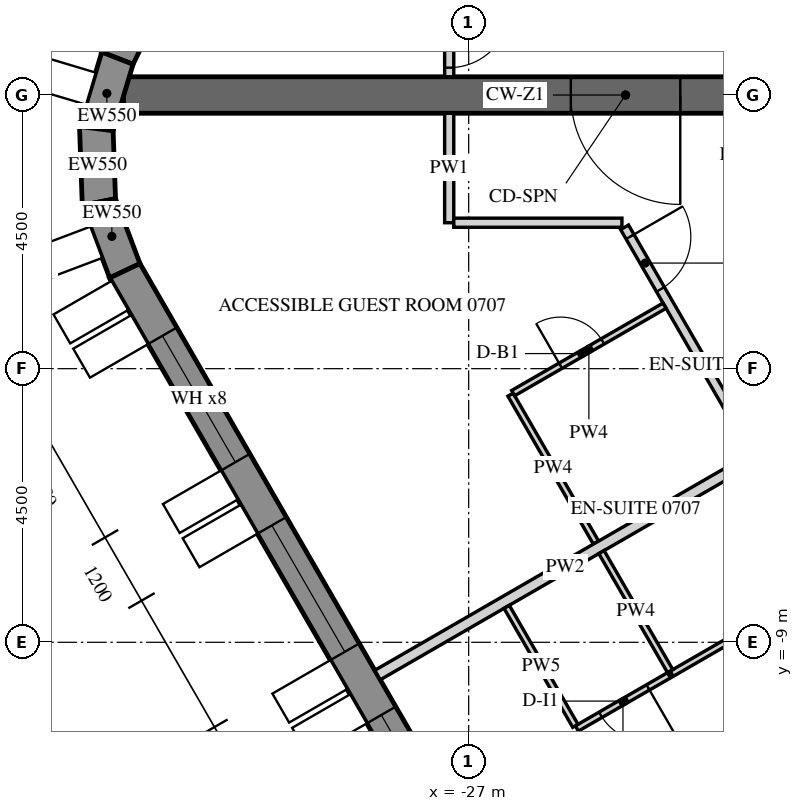
"""IFC4 building model, lengths in metres.
Left out: names, types, materials, properties, quantities, classifications, styles, units other than length and angle.
Written with IfcOpenShell. Run it as: python <this file> out.ifc"""

import sys

from ifc_helpers import new_model, si_unit, direction, frame, frame_2d, origin, place, context, subcontext, project, spatial, polyline, rectangle, outline, extrude, element, fill, save


model = new_model("IFC4")
c1 = context("Model", 3, precision=1e-05, world=origin(), true_north=direction((0.0, 1.0)))
c2 = subcontext(c1, "Body", "Model", "MODEL_VIEW")
j1 = project(units=[si_unit("LENGTHUNIT", "METRE"), si_unit("PLANEANGLEUNIT", "RADIAN")], contexts=[c1])
p1 = place(None, origin())
s1 = spatial("IfcSite", under=j1, at=p1, CompositionType="ELEMENT")
p2 = place(p1, origin())
s2 = spatial("IfcBuilding", under=s1, at=p2, CompositionType="ELEMENT")
p3 = place(p2, frame((0.0, 0.0, 99.9)))
s3 = spatial("IfcBuildingStorey", under=s2, at=p3, CompositionType="ELEMENT", Elevation=99.9)
p4 = place(p3, frame((-19.595, 27.633, -0.15), z_axis=(0.0, 0.0, 1.0), x_axis=(-0.438368285794, -0.898795441694, 0.0)))
e1 = element("IfcWall", 1, at=p4, inside=s3, PredefinedType="SOLIDWALL", context=c2, shape_type="SweptSolid", body=[
    extrude(outline(polyline([(-0.026, -0.275), (30.093, -0.275), (30.048, 0.275), (0.026, 0.275), (-0.026, -0.275)])), origin(), (0.0, 0.0, 1.0), 3.9),
])
p5 = place(p4, frame((1.236, 0.0, 1.05)))
e2 = element("IfcOpeningElement", 2, at=p5, cuts=e1, PredefinedType="OPENING", context=c2, shape_type="SweptSolid", body=[
    extrude(rectangle(XDim=2.4, YDim=2.4, at=frame_2d((1.2, 1.2))), frame((0.0, 0.285, 0.0), z_axis=(0.0, -1.0, 0.0), x_axis=(1.0, 0.0, 0.0)), (0.0, 0.0, 1.0), 0.57),
])
p6 = place(p4, frame((4.835, 0.0, 1.05)))
e3 = element("IfcOpeningElement", 3, at=p6, cuts=e1, PredefinedType="OPENING", context=c2, shape_type="SweptSolid", body=[
    extrude(rectangle(XDim=2.4, YDim=2.4, at=frame_2d((1.2, 1.2))), frame((0.0, 0.285, 0.0), z_axis=(0.0, -1.0, 0.0), x_axis=(1.0, 0.0, 0.0)), (0.0, 0.0, 1.0), 0.57),
])
p7 = place(p4, frame((8.436, 0.0, 1.05)))
e4 = element("IfcOpeningElement", 4, at=p7, cuts=e1, PredefinedType="OPENING", context=c2, shape_type="SweptSolid", body=[
    extrude(rectangle(XDim=2.4, YDim=2.4, at=frame_2d((1.2, 1.2))), frame((0.0, 0.285, 0.0), z_axis=(0.0, -1.0, 0.0), x_axis=(1.0, 0.0, 0.0)), (0.0, 0.0, 1.0), 0.57),
])
p8 = place(p4, frame((12.035, 0.0, 1.05)))
e5 = element("IfcOpeningElement", 5, at=p8, cuts=e1, PredefinedType="OPENING", context=c2, shape_type="SweptSolid", body=[
    extrude(rectangle(XDim=2.4, YDim=2.4, at=frame_2d((1.2, 1.2))), frame((0.0, 0.285, 0.0), z_axis=(0.0, -1.0, 0.0), x_axis=(1.0, 0.0, 0.0)), (0.0, 0.0, 1.0), 0.57),
])
p9 = place(p4, frame((15.635, 0.0, 1.05)))
e6 = element("IfcOpeningElement", 6, at=p9, cuts=e1, PredefinedType="OPENING", context=c2, shape_type="SweptSolid", body=[
    extrude(rectangle(XDim=2.4, YDim=2.4, at=frame_2d((1.2, 1.2))), frame((0.0, 0.285, 0.0), z_axis=(0.0, -1.0, 0.0), x_axis=(1.0, 0.0, 0.0)), (0.0, 0.0, 1.0), 0.57),
])
p10 = place(p4, frame((19.236, 0.0, 1.05)))
e7 = element("IfcOpeningElement", 7, at=p10, cuts=e1, PredefinedType="OPENING", context=c2, shape_type="SweptSolid", body=[
    extrude(rectangle(XDim=2.4, YDim=2.4, at=frame_2d((1.2, 1.2))), frame((0.0, 0.285, 0.0), z_axis=(0.0, -1.0, 0.0), x_axis=(1.0, 0.0, 0.0)), (0.0, 0.0, 1.0), 0.57),
])
p11 = place(p4, frame((22.835, 0.0, 1.05)))
e8 = element("IfcOpeningElement", 8, at=p11, cuts=e1, PredefinedType="OPENING", context=c2, shape_type="SweptSolid", body=[
    extrude(rectangle(XDim=2.4, YDim=2.4, at=frame_2d((1.2, 1.2))), frame((0.0, 0.285, 0.0), z_axis=(0.0, -1.0, 0.0), x_axis=(1.0, 0.0, 0.0)), (0.0, 0.0, 1.0), 0.57),
])
p12 = place(p4, frame((26.436, 0.0, 1.05)))
e9 = element("IfcOpeningElement", 9, at=p12, cuts=e1, PredefinedType="OPENING", context=c2, shape_type="SweptSolid", body=[
    extrude(rectangle(XDim=2.4, YDim=2.4, at=frame_2d((1.2, 1.2))), frame((0.0, 0.285, 0.0), z_axis=(0.0, -1.0, 0.0), x_axis=(1.0, 0.0, 0.0)), (0.0, 0.0, 1.0), 0.57),
])
p13 = place(p3, frame((-32.777, 0.605, -0.15), z_axis=(0.0, 0.0, 1.0), x_axis=(-0.286921497463, -0.957954098219, 0.0)))
e10 = element("IfcWall", 10, at=p13, inside=s3, PredefinedType="SOLIDWALL", context=c2, shape_type="SweptSolid", body=[
    extrude(outline(polyline([(-0.022, -0.275), (1.253, -0.275), (1.163, 0.275), (0.022, 0.275), (-0.022, -0.275)])), origin(), (0.0, 0.0, 1.0), 3.9),
])
p14 = place(p3, frame((-33.124, -0.552, -0.15), z_axis=(0.0, 0.0, 1.0), x_axis=(0.03495638276, -0.999388838893, 0.0)))
e11 = element("IfcWall", 11, at=p14, inside=s3, PredefinedType="SOLIDWALL", context=c2, shape_type="SweptSolid", body=[
    extrude(outline(polyline([(-0.045, -0.275), (1.253, -0.275), (1.163, 0.275), (0.045, 0.275), (-0.045, -0.275)])), origin(), (0.0, 0.0, 1.0), 3.9),
])
p15 = place(p3, frame((-33.081, -1.76, -0.15), z_axis=(0.0, 0.0, 1.0), x_axis=(0.353027214741, -0.935613053378, 0.0)))
e12 = element("IfcWall", 12, at=p15, inside=s3, PredefinedType="SOLIDWALL", context=c2, shape_type="SweptSolid", body=[
    extrude(outline(polyline([(-0.045, -0.275), (1.231, -0.275), (1.186, 0.275), (0.045, 0.275), (-0.045, -0.275)])), origin(), (0.0, 0.0, 1.0), 3.9),
])
p16 = place(p3, frame((-32.655, -2.89, -0.15), z_axis=(0.0, 0.0, 1.0), x_axis=(0.499997711317, -0.866026725152, 0.0)))
e13 = element("IfcWall", 13, at=p16, inside=s3, PredefinedType="SOLIDWALL", context=c2, shape_type="SweptSolid", body=[
    extrude(outline(polyline([(-0.022, -0.275), (30.097, -0.275), (30.045, 0.275), (0.022, 0.275), (-0.022, -0.275)])), origin(), (0.0, 0.0, 1.0), 3.9),
])
p17 = place(p16, frame((1.236, 0.0, 1.05)))
e14 = element("IfcOpeningElement", 14, at=p17, cuts=e13, PredefinedType="OPENING", context=c2, shape_type="SweptSolid", body=[
    extrude(rectangle(XDim=2.4, YDim=2.4, at=frame_2d((1.2, 1.2))), frame((0.0, 0.285, 0.0), z_axis=(0.0, -1.0, 0.0), x_axis=(1.0, 0.0, 0.0)), (0.0, 0.0, 1.0), 0.57),
])
p18 = place(p16, frame((4.835, 0.0, 1.05)))
e15 = element("IfcOpeningElement", 15, at=p18, cuts=e13, PredefinedType="OPENING", context=c2, shape_type="SweptSolid", body=[
    extrude(rectangle(XDim=2.4, YDim=2.4, at=frame_2d((1.2, 1.2))), frame((0.0, 0.285, 0.0), z_axis=(0.0, -1.0, 0.0), x_axis=(1.0, 0.0, 0.0)), (0.0, 0.0, 1.0), 0.57),
])
p19 = place(p16, frame((8.436, 0.0, 1.05)))
e16 = element("IfcOpeningElement", 16, at=p19, cuts=e13, PredefinedType="OPENING", context=c2, shape_type="SweptSolid", body=[
    extrude(rectangle(XDim=2.4, YDim=2.4, at=frame_2d((1.2, 1.2))), frame((0.0, 0.285, 0.0), z_axis=(0.0, -1.0, 0.0), x_axis=(1.0, 0.0, 0.0)), (0.0, 0.0, 1.0), 0.57),
])
p20 = place(p16, frame((12.035, 0.0, 1.05)))
e17 = element("IfcOpeningElement", 17, at=p20, cuts=e13, PredefinedType="OPENING", context=c2, shape_type="SweptSolid", body=[
    extrude(rectangle(XDim=2.4, YDim=2.4, at=frame_2d((1.2, 1.2))), frame((0.0, 0.285, 0.0), z_axis=(0.0, -1.0, 0.0), x_axis=(1.0, 0.0, 0.0)), (0.0, 0.0, 1.0), 0.57),
])
p21 = place(p16, frame((15.635, 0.0, 1.05)))
e18 = element("IfcOpeningElement", 18, at=p21, cuts=e13, PredefinedType="OPENING", context=c2, shape_type="SweptSolid", body=[
    extrude(rectangle(XDim=2.4, YDim=2.4, at=frame_2d((1.2, 1.2))), frame((0.0, 0.285, 0.0), z_axis=(0.0, -1.0, 0.0), x_axis=(1.0, 0.0, 0.0)), (0.0, 0.0, 1.0), 0.57),
])
p22 = place(p16, frame((19.236, 0.0, 1.05)))
e19 = element("IfcOpeningElement", 19, at=p22, cuts=e13, PredefinedType="OPENING", context=c2, shape_type="SweptSolid", body=[
    extrude(rectangle(XDim=2.4, YDim=2.4, at=frame_2d((1.2, 1.2))), frame((0.0, 0.285, 0.0), z_axis=(0.0, -1.0, 0.0), x_axis=(1.0, 0.0, 0.0)), (0.0, 0.0, 1.0), 0.57),
])
p23 = place(p16, frame((22.835, 0.0, 1.05)))
e20 = element("IfcOpeningElement", 20, at=p23, cuts=e13, PredefinedType="OPENING", context=c2, shape_type="SweptSolid", body=[
    extrude(rectangle(XDim=2.4, YDim=2.4, at=frame_2d((1.2, 1.2))), frame((0.0, 0.285, 0.0), z_axis=(0.0, -1.0, 0.0), x_axis=(1.0, 0.0, 0.0)), (0.0, 0.0, 1.0), 0.57),
])
p24 = place(p16, frame((26.436, 0.0, 1.05)))
e21 = element("IfcOpeningElement", 21, at=p24, cuts=e13, PredefinedType="OPENING", context=c2, shape_type="SweptSolid", body=[
    extrude(rectangle(XDim=2.4, YDim=2.4, at=frame_2d((1.2, 1.2))), frame((0.0, 0.285, 0.0), z_axis=(0.0, -1.0, 0.0), x_axis=(1.0, 0.0, 0.0)), (0.0, 0.0, 1.0), 0.57),
])
p25 = place(p3, frame((-16.166, 0.0, -0.15), z_axis=(0.0, 0.0, 1.0), x_axis=(-1.0, 0.0, 0.0)))
e22 = element("IfcWall", 22, at=p25, inside=s3, PredefinedType="SHEAR", context=c2, shape_type="SweptSolid", body=[
    extrude(rectangle(XDim=16.509, YDim=0.6, at=frame_2d((8.254, 0.0))), origin(), (0.0, 0.0, 1.0), 3.9),
])
p26 = place(p25, frame((7.354, 0.0, 0.15)))
e23 = element("IfcOpeningElement", 23, at=p26, cuts=e22, PredefinedType="OPENING", context=c2, shape_type="SweptSolid", body=[
    extrude(rectangle(XDim=1.8, YDim=2.4, at=frame_2d((0.9, 1.2))), frame((0.0, 0.31, 0.0), z_axis=(0.0, -1.0, 0.0), x_axis=(1.0, 0.0, 0.0)), (0.0, 0.0, 1.0), 0.62),
])
p27 = place(p3, frame((-27.32, 2.025, 0.0), z_axis=(0.0, 0.0, 1.0), x_axis=(0.0, -1.0, 0.0)))
e24 = element("IfcWall", 24, at=p27, inside=s3, PredefinedType="PARTITIONING", context=c2, shape_type="SweptSolid", body=[
    extrude(rectangle(XDim=1.725, YDim=0.15, at=frame_2d((0.862, 0.0))), origin(), (0.0, 0.0, 1.0), 2.988),
])
p28 = place(p27, frame((0.575, 0.0, 0.0)))
e25 = element("IfcOpeningElement", 25, at=p28, cuts=e24, PredefinedType="OPENING", context=c2, shape_type="SweptSolid", body=[
    extrude(rectangle(XDim=1.0, YDim=2.1, at=frame_2d((0.5, 1.05))), frame((0.0, 0.085, 0.0), z_axis=(0.0, -1.0, 0.0), x_axis=(1.0, 0.0, 0.0)), (0.0, 0.0, 1.0), 0.17),
])
p29 = place(p3, frame((-27.32, -0.3, 0.0), z_axis=(0.0, 0.0, 1.0), x_axis=(0.0, -1.0, 0.0)))
e26 = element("IfcWall", 26, at=p29, inside=s3, PredefinedType="PARTITIONING", context=c2, shape_type="SweptSolid", body=[
    extrude(rectangle(XDim=1.8, YDim=0.15, at=frame_2d((0.9, 0.0))), origin(), (0.0, 0.0, 1.0), 2.988),
])
p30 = place(p3, frame((-27.245, -2.1, 0.0), z_axis=(0.0, 0.0, 1.0), x_axis=(1.0, 0.0, 0.0)))
e27 = element("IfcWall", 27, at=p30, inside=s3, PredefinedType="PARTITIONING", context=c2, shape_type="SweptSolid", body=[
    extrude(rectangle(XDim=2.766, YDim=0.15, at=frame_2d((1.383, 0.0))), origin(), (0.0, 0.0, 1.0), 2.988),
])
p31 = place(p3, frame((-24.436, -2.175, 0.0), z_axis=(0.0, 0.0, 1.0), x_axis=(0.499996816197, -0.866027241946, 0.0)))
e28 = element("IfcWall", 28, at=p31, inside=s3, PredefinedType="PARTITIONING", context=c2, shape_type="SweptSolid", body=[
    extrude(rectangle(XDim=24.238, YDim=0.15, at=frame_2d((12.119, 0.0))), origin(), (0.0, 0.0, 1.0), 2.988),
])
p32 = place(p31, frame((0.179, 0.0, 0.0)))
e29 = element("IfcOpeningElement", 29, at=p32, cuts=e28, PredefinedType="OPENING", context=c2, shape_type="SweptSolid", body=[
    extrude(rectangle(XDim=1.0, YDim=2.1, at=frame_2d((0.5, 1.05))), frame((0.0, 0.085, 0.0), z_axis=(0.0, -1.0, 0.0), x_axis=(1.0, 0.0, 0.0)), (0.0, 0.0, 1.0), 0.17),
])
p33 = place(p31, frame((12.246, 0.0, 0.0)))
e30 = element("IfcOpeningElement", 30, at=p33, cuts=e28, PredefinedType="OPENING", context=c2, shape_type="SweptSolid", body=[
    extrude(rectangle(XDim=1.0, YDim=2.1, at=frame_2d((0.5, 1.05))), frame((0.0, 0.085, 0.0), z_axis=(0.0, -1.0, 0.0), x_axis=(1.0, 0.0, 0.0)), (0.0, 0.0, 1.0), 0.17),
])
p34 = place(p31, frame((19.792, 0.0, 0.0)))
e31 = element("IfcOpeningElement", 31, at=p34, cuts=e28, PredefinedType="OPENING", context=c2, shape_type="SweptSolid", body=[
    extrude(rectangle(XDim=1.0, YDim=2.1, at=frame_2d((0.5, 1.05))), frame((0.0, 0.085, 0.0), z_axis=(0.0, -1.0, 0.0), x_axis=(1.0, 0.0, 0.0)), (0.0, 0.0, 1.0), 0.17),
])
p35 = place(p3, frame((-24.907, -7.361, 0.0), z_axis=(0.0, 0.0, 1.0), x_axis=(-0.499933044277, 0.866064057238, 0.0)))
e32 = element("IfcWall", 32, at=p35, inside=s3, PredefinedType="PARTITIONING", context=c2, shape_type="SweptSolid", body=[
    extrude(rectangle(XDim=2.81, YDim=0.1, at=frame_2d((1.405, 0.0))), origin(), (0.0, 0.0, 1.0), 2.988),
])
p36 = place(p3, frame((-26.268, -4.902, 0.0), z_axis=(0.0, 0.0, 1.0), x_axis=(0.866018712932, 0.500011588718, 0.0)))
e33 = element("IfcWall", 33, at=p36, inside=s3, PredefinedType="PARTITIONING", context=c2, shape_type="SweptSolid", body=[
    extrude(rectangle(XDim=2.875, YDim=0.1, at=frame_2d((1.438, 0.0))), origin(), (0.0, 0.0, 1.0), 2.988),
])
p37 = place(p36, frame((0.9, 0.0, 0.0)))
e34 = element("IfcOpeningElement", 34, at=p37, cuts=e33, PredefinedType="OPENING", context=c2, shape_type="SweptSolid", body=[
    extrude(rectangle(XDim=0.8, YDim=2.1, at=frame_2d((0.4, 1.05))), frame((0.0, 0.06, 0.0), z_axis=(0.0, -1.0, 0.0), x_axis=(1.0, 0.0, 0.0)), (0.0, 0.0, 1.0), 0.12),
])
p38 = place(p3, frame((-28.499, -9.538, 0.0), z_axis=(0.0, 0.0, 1.0), x_axis=(0.866024672353, 0.500001266874, 0.0)))
e35 = element("IfcWall", 35, at=p38, inside=s3, PredefinedType="PARTITIONING", context=c2, shape_type="SweptSolid", body=[
    extrude(rectangle(XDim=7.125, YDim=0.18, at=frame_2d((3.562, 0.0))), origin(), (0.0, 0.0, 1.0), 2.988),
])
p39 = place(p3, frame((-21.128, -8.054, 0.0), z_axis=(0.0, 0.0, 1.0), x_axis=(-0.866046596414, -0.499963291492, 0.0)))
e36 = element("IfcWall", 36, at=p39, inside=s3, PredefinedType="PARTITIONING", context=c2, shape_type="SweptSolid", body=[
    extrude(rectangle(XDim=2.925, YDim=0.1, at=frame_2d((1.462, 0.0))), origin(), (0.0, 0.0, 1.0), 2.988),
])
p40 = place(p39, frame((1.025, 0.0, 0.0)))
e37 = element("IfcOpeningElement", 37, at=p40, cuts=e36, PredefinedType="OPENING", context=c2, shape_type="SweptSolid", body=[
    extrude(rectangle(XDim=0.8, YDim=2.1, at=frame_2d((0.4, 1.05))), frame((0.0, 0.06, 0.0), z_axis=(0.0, -1.0, 0.0), x_axis=(1.0, 0.0, 0.0)), (0.0, 0.0, 1.0), 0.12),
])
p41 = place(p3, frame((-23.705, -9.542, 0.0), z_axis=(0.0, 0.0, 1.0), x_axis=(-0.866036909293, -0.499980071345, 0.0)))
e38 = element("IfcWall", 38, at=p41, inside=s3, PredefinedType="PARTITIONING", context=c2, shape_type="SweptSolid", body=[
    extrude(rectangle(XDim=1.75, YDim=0.1, at=frame_2d((0.875, 0.0))), origin(), (0.0, 0.0, 1.0), 2.988),
])
p42 = place(p41, frame((0.4, 0.0, 0.0)))
e39 = element("IfcOpeningElement", 39, at=p42, cuts=e38, PredefinedType="OPENING", context=c2, shape_type="SweptSolid", body=[
    extrude(rectangle(XDim=0.9, YDim=2.1, at=frame_2d((0.45, 1.05))), frame((0.0, 0.06, 0.0), z_axis=(0.0, -1.0, 0.0), x_axis=(1.0, 0.0, 0.0)), (0.0, 0.0, 1.0), 0.12),
])
for number, where, z_axis, x_axis in (
    (40, (-25.245, -10.374, 0.0), (0.0, 0.0, 1.0), (-0.5, 0.866, 0.0)),
    (41, (-24.817, -7.516, 0.0), (0.0, 0.0, 1.0), (0.5, -0.866, 0.0)),
):
    element("IfcWall", number, at=place(p3, frame(where, z_axis=z_axis, x_axis=x_axis)), inside=s3, PredefinedType="PARTITIONING", context=c2, shape_type="SweptSolid", body=[
        extrude(rectangle(XDim=2.26, YDim=0.1, at=frame_2d((1.13, 0.0))), origin(), (0.0, 0.0, 1.0), 2.988),
    ])
p43 = place(p17, frame((0.0, 0.205, 0.0)))
e42 = element("IfcWindow", 42, at=p43, inside=s3, PartitioningType="DOUBLE_PANEL_VERTICAL", PredefinedType="WINDOW", context=c2, shape_type="SweptSolid", body=[
    extrude(rectangle(XDim=2.4, YDim=2.4, at=frame_2d((1.2, 1.2))), frame((0.0, 0.03, 0.0), z_axis=(0.0, -1.0, 0.0), x_axis=(1.0, 0.0, 0.0)), (0.0, 0.0, 1.0), 0.06),
])
fill(e14, e42)
p44 = place(p18, frame((0.0, 0.205, 0.0)))
e43 = element("IfcWindow", 43, at=p44, inside=s3, PartitioningType="DOUBLE_PANEL_VERTICAL", PredefinedType="WINDOW", context=c2, shape_type="SweptSolid", body=[
    extrude(rectangle(XDim=2.4, YDim=2.4, at=frame_2d((1.2, 1.2))), frame((0.0, 0.03, 0.0), z_axis=(0.0, -1.0, 0.0), x_axis=(1.0, 0.0, 0.0)), (0.0, 0.0, 1.0), 0.06),
])
fill(e15, e43)
p45 = place(p19, frame((0.0, 0.205, 0.0)))
e44 = element("IfcWindow", 44, at=p45, inside=s3, PartitioningType="DOUBLE_PANEL_VERTICAL", PredefinedType="WINDOW", context=c2, shape_type="SweptSolid", body=[
    extrude(rectangle(XDim=2.4, YDim=2.4, at=frame_2d((1.2, 1.2))), frame((0.0, 0.03, 0.0), z_axis=(0.0, -1.0, 0.0), x_axis=(1.0, 0.0, 0.0)), (0.0, 0.0, 1.0), 0.06),
])
fill(e16, e44)
p46 = place(p26, origin())
e45 = element("IfcDoor", 45, at=p46, inside=s3, OperationType="DOUBLE_DOOR_SINGLE_SWING", PredefinedType="DOOR", context=c2, shape_type="SweptSolid", body=[
    extrude(rectangle(XDim=1.8, YDim=2.4, at=frame_2d((0.9, 1.2))), frame((0.0, 0.025, 0.0), z_axis=(0.0, -1.0, 0.0), x_axis=(1.0, 0.0, 0.0)), (0.0, 0.0, 1.0), 0.05),
])
fill(e23, e45)
p47 = place(p28, origin())
e46 = element("IfcDoor", 46, at=p47, inside=s3, OperationType="SINGLE_SWING_LEFT", PredefinedType="DOOR", context=c2, shape_type="SweptSolid", body=[
    extrude(rectangle(XDim=1.0, YDim=2.1, at=frame_2d((0.5, 1.05))), frame((0.0, 0.025, 0.0), z_axis=(0.0, -1.0, 0.0), x_axis=(1.0, 0.0, 0.0)), (0.0, 0.0, 1.0), 0.05),
])
fill(e25, e46)
p48 = place(p32, origin())
e47 = element("IfcDoor", 47, at=p48, inside=s3, OperationType="SINGLE_SWING_RIGHT", PredefinedType="DOOR", context=c2, shape_type="SweptSolid", body=[
    extrude(rectangle(XDim=1.0, YDim=2.1, at=frame_2d((0.5, 1.05))), frame((0.0, 0.025, 0.0), z_axis=(0.0, -1.0, 0.0), x_axis=(1.0, 0.0, 0.0)), (0.0, 0.0, 1.0), 0.05),
])
fill(e29, e47)
p49 = place(p37, origin())
e48 = element("IfcDoor", 48, at=p49, inside=s3, OperationType="SINGLE_SWING_RIGHT", PredefinedType="DOOR", context=c2, shape_type="SweptSolid", body=[
    extrude(rectangle(XDim=0.8, YDim=2.1, at=frame_2d((0.4, 1.05))), frame((0.0, 0.025, 0.0), z_axis=(0.0, -1.0, 0.0), x_axis=(1.0, 0.0, 0.0)), (0.0, 0.0, 1.0), 0.05),
])
fill(e34, e48)
p50 = place(p42, origin())
e49 = element("IfcDoor", 49, at=p50, inside=s3, OperationType="SINGLE_SWING_RIGHT", PredefinedType="DOOR", context=c2, shape_type="SweptSolid", body=[
    extrude(rectangle(XDim=0.9, YDim=2.1, at=frame_2d((0.45, 1.05))), frame((0.0, 0.025, 0.0), z_axis=(0.0, -1.0, 0.0), x_axis=(1.0, 0.0, 0.0)), (0.0, 0.0, 1.0), 0.05),
])
fill(e39, e49)
save(model, sys.argv[1])
